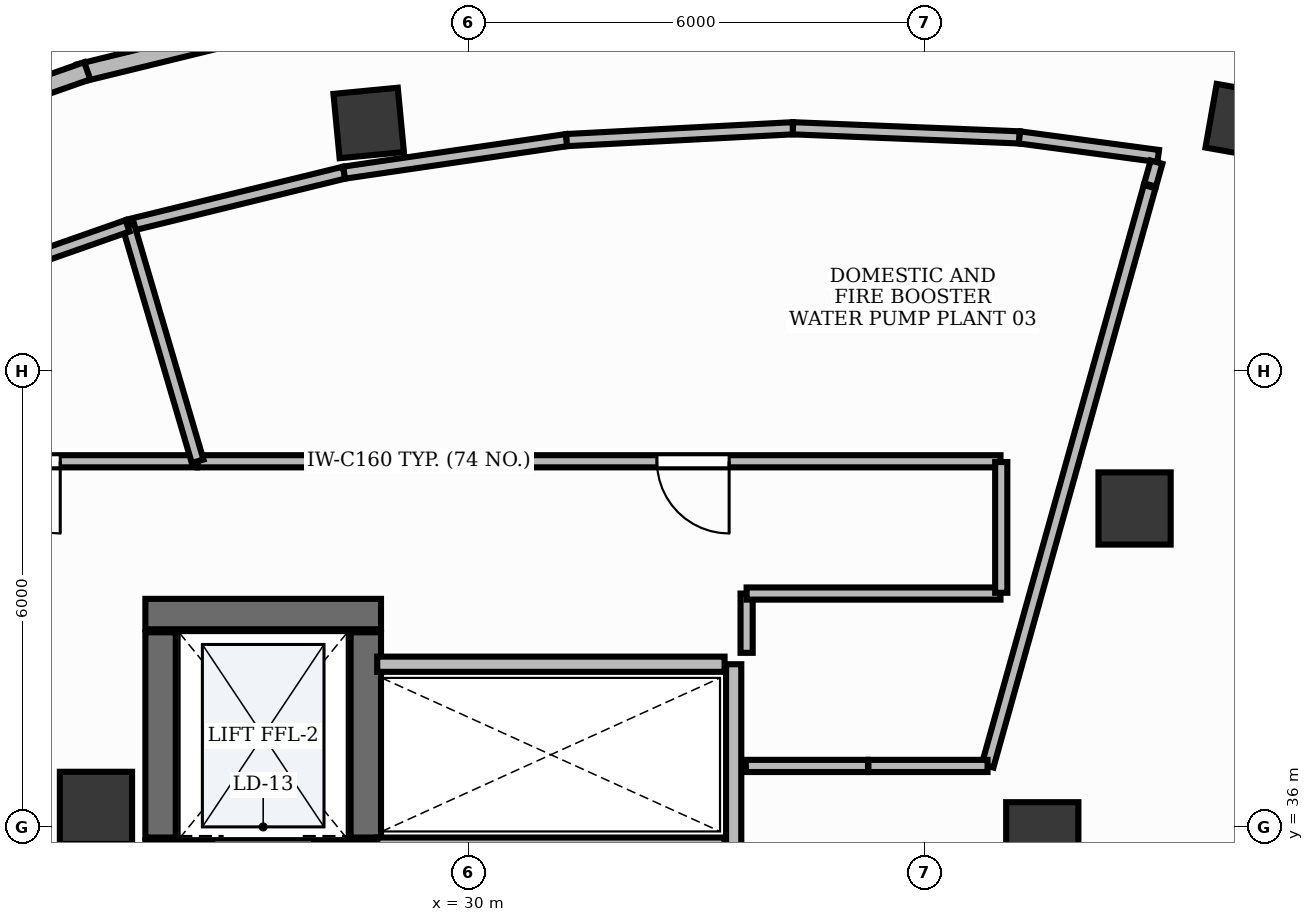
"""IFC4 building model, lengths in metres.
Left out: names, types, materials, properties, quantities, classifications, styles, units other than length and angle.
Written with IfcOpenShell. Run it as: python <this file> out.ifc"""

import sys

from ifc_helpers import new_model, si_unit, direction, frame, frame_2d, origin, origin_2d, place, context, subcontext, project, spatial, rectangle, extrude, element, fill, save


model = new_model("IFC4")
c1 = context("Model", 3, precision=1e-05, world=origin(), true_north=direction((0.0, 1.0)))
c2 = subcontext(c1, "Body", "Model", "MODEL_VIEW")
j1 = project(units=[si_unit("LENGTHUNIT", "METRE"), si_unit("PLANEANGLEUNIT", "RADIAN")], contexts=[c1])
p1 = place(None, origin())
s1 = spatial("IfcSite", under=j1, at=p1, CompositionType="ELEMENT")
p2 = place(p1, origin())
s2 = spatial("IfcBuilding", under=s1, at=p2, CompositionType="ELEMENT")
p3 = place(p2, frame((0.0, 0.0, 277.2)))
s3 = spatial("IfcBuildingStorey", under=s2, at=p3, CompositionType="ELEMENT", Elevation=277.2)
p4 = place(p3, frame((25.75, 38.8, 0.0), z_axis=(0.0, 0.0, 1.0), x_axis=(1.0, 0.0, 0.0)))
e1 = element("IfcWall", 1, at=p4, inside=s3, PredefinedType="SHEAR", context=c2, shape_type="SweptSolid", body=[
    extrude(rectangle(XDim=3.1, YDim=0.4, at=frame_2d((1.55, 0.0))), origin(), (0.0, 0.0, 1.0), 5.1),
])
p5 = place(p3, frame((25.75, 35.62, 0.0), z_axis=(0.0, 0.0, 1.0), x_axis=(1.0, 0.0, 0.0)))
e2 = element("IfcWall", 2, at=p5, inside=s3, PredefinedType="SHEAR", context=c2, shape_type="SweptSolid", body=[
    extrude(rectangle(XDim=3.1, YDim=0.4, at=frame_2d((1.55, 0.0))), origin(), (0.0, 0.0, 1.0), 5.1),
])
p6 = place(p5, frame((0.9, 0.0, 0.0)))
e3 = element("IfcOpeningElement", 3, at=p6, cuts=e2, PredefinedType="OPENING", context=c2, shape_type="SweptSolid", body=[
    extrude(rectangle(XDim=1.3, YDim=2.2, at=frame_2d((0.65, 1.1))), frame((0.0, 0.215, 0.0), z_axis=(0.0, -1.0, 0.0), x_axis=(1.0, 0.0, 0.0)), (0.0, 0.0, 1.0), 0.43),
])
for number, where, z_axis, x_axis in (
    (4, (25.95, 35.86, 0.0), (0.0, 0.0, 1.0), (0.0, 1.0, 0.0)),
    (5, (28.65, 35.86, 0.0), (0.0, 0.0, 1.0), (0.0, 1.0, 0.0)),
):
    element("IfcWall", number, at=place(p3, frame(where, z_axis=z_axis, x_axis=x_axis)), inside=s3, PredefinedType="SHEAR", context=c2, shape_type="SweptSolid", body=[
        extrude(rectangle(XDim=2.7, YDim=0.4, at=frame_2d((1.35, 0.0))), origin(), (0.0, 0.0, 1.0), 5.1),
    ])
for number, where, z_axis, x_axis in (
    (6, (37.55, 35.85, -0.0), (0.0, 0.0, 1.0), (1.0, 0.0, 0.0)),
    (7, (25.1, 36.25, -0.0), (0.0, 0.0, 1.0), (1.0, 0.0, 0.0)),
):
    element("IfcColumn", number, at=place(p3, frame(where, z_axis=z_axis, x_axis=x_axis)), inside=s3, PredefinedType="PILASTER", context=c2, shape_type="SweptSolid", body=[
        extrude(rectangle(XDim=0.95, YDim=0.95, at=origin_2d()), origin(), (0.0, 0.0, 1.0), 5.101),
    ])
p7 = place(p3, frame((40.189, 45.282, -0.0), z_axis=(0.0, 0.0, 1.0), x_axis=(-0.984868307662, 0.173304404339, 0.0)))
e8 = element("IfcColumn", 8, at=p7, inside=s3, PredefinedType="COLUMN", context=c2, shape_type="SweptSolid", body=[
    extrude(rectangle(XDim=0.85, YDim=0.85, at=origin_2d()), origin(), (0.0, 0.0, 1.0), 5.101),
])
p8 = place(p3, frame((38.764, 40.189, -0.0), z_axis=(0.0, 0.0, 1.0), x_axis=(1.0, 0.0, 0.0)))
e9 = element("IfcColumn", 9, at=p8, inside=s3, PredefinedType="COLUMN", context=c2, shape_type="SweptSolid", body=[
    extrude(rectangle(XDim=0.95, YDim=0.95, at=origin_2d()), origin(), (0.0, 0.0, 1.0), 5.101),
])
p9 = place(p3, frame((28.688, 45.261, -0.0), z_axis=(0.0, 0.0, 1.0), x_axis=(0.995462868748, 0.095150811579, 0.0)))
e10 = element("IfcColumn", 10, at=p9, inside=s3, PredefinedType="COLUMN", context=c2, shape_type="SweptSolid", body=[
    extrude(rectangle(XDim=0.85, YDim=0.85, at=origin_2d()), origin(), (0.0, 0.0, 1.0), 5.101),
])
p10 = place(p3, frame((28.015, 46.684, 0.0), z_axis=(0.0, 0.0, 1.0), x_axis=(-0.971313704184, -0.237801783141, 0.0)))
e11 = element("IfcWall", 11, at=p10, inside=s3, PredefinedType="STANDARD", context=c2, shape_type="SweptSolid", body=[
    extrude(rectangle(XDim=3.23, YDim=0.24, at=frame_2d((1.615, 0.0))), origin(), (0.0, 0.0, 1.0), 5.1),
])
p11 = place(p3, frame((24.985, 45.947, 0.0), z_axis=(0.0, 0.0, 1.0), x_axis=(-0.943487427594, -0.331408319104, 0.0)))
e12 = element("IfcWall", 12, at=p11, inside=s3, PredefinedType="STANDARD", context=c2, shape_type="SweptSolid", body=[
    extrude(rectangle(XDim=3.176, YDim=0.24, at=frame_2d((1.588, 0.0))), origin(), (0.0, 0.0, 1.0), 5.1),
])
p12 = place(p3, frame((33.49, 35.76, 0.0), z_axis=(0.0, 0.0, 1.0), x_axis=(0.0, 1.0, 0.0)))
e13 = element("IfcWall", 13, at=p12, inside=s3, PredefinedType="PARTITIONING", context=c2, shape_type="SweptSolid", body=[
    extrude(rectangle(XDim=2.38, YDim=0.2, at=frame_2d((1.19, 0.0))), origin(), (0.0, 0.0, 1.0), 3.41),
])
for number, where, z_axis, x_axis in (
    (14, (28.8, 35.76, 0.0), (0.0, 0.0, 1.0), (1.0, 0.0, 0.0)),
    (15, (28.8, 38.14, 0.0), (0.0, 0.0, 1.0), (1.0, 0.0, 0.0)),
):
    element("IfcWall", number, at=place(p3, frame(where, z_axis=z_axis, x_axis=x_axis)), inside=s3, PredefinedType="PARTITIONING", context=c2, shape_type="SweptSolid", body=[
        extrude(rectangle(XDim=4.57, YDim=0.2, at=frame_2d((2.285, 0.0))), origin(), (0.0, 0.0, 1.0), 3.41),
    ])
p13 = place(p3, frame((37.0, 40.81, 0.0), z_axis=(0.0, 0.0, 1.0), x_axis=(-1.0, 0.0, 0.0)))
e16 = element("IfcWall", 16, at=p13, inside=s3, PredefinedType="PARTITIONING", context=c2, shape_type="SweptSolid", body=[
    extrude(rectangle(XDim=10.562, YDim=0.16, at=frame_2d((5.281, 0.0))), origin(), (0.0, 0.0, 1.0), 3.41),
])
p14 = place(p13, frame((3.57, 0.0, 0.0)))
e17 = element("IfcOpeningElement", 17, at=p14, cuts=e16, PredefinedType="OPENING", context=c2, shape_type="SweptSolid", body=[
    extrude(rectangle(XDim=0.95, YDim=2.15, at=frame_2d((0.475, 1.075))), frame((0.0, 0.095, 0.0), z_axis=(0.0, -1.0, 0.0), x_axis=(1.0, 0.0, 0.0)), (0.0, 0.0, 1.0), 0.19),
])
p15 = place(p3, frame((26.427, 40.81, 0.0), z_axis=(0.0, 0.0, 1.0), x_axis=(-1.0, 0.0, 0.0)))
e18 = element("IfcWall", 18, at=p15, inside=s3, PredefinedType="PARTITIONING", context=c2, shape_type="SweptSolid", body=[
    extrude(rectangle(XDim=5.827, YDim=0.16, at=frame_2d((2.914, 0.0))), origin(), (0.0, 0.0, 1.0), 3.41),
])
p16 = place(p15, frame((1.797, 0.0, 0.0)))
e19 = element("IfcOpeningElement", 19, at=p16, cuts=e18, PredefinedType="OPENING", context=c2, shape_type="SweptSolid", body=[
    extrude(rectangle(XDim=0.95, YDim=2.15, at=frame_2d((0.475, 1.075))), frame((0.0, 0.095, 0.0), z_axis=(0.0, -1.0, 0.0), x_axis=(1.0, 0.0, 0.0)), (0.0, 0.0, 1.0), 0.19),
])
p17 = place(p3, frame((25.532, 43.913, 0.0), z_axis=(0.0, 0.0, 1.0), x_axis=(0.971298495948, 0.23786389337, 0.0)))
e20 = element("IfcWall", 20, at=p17, inside=s3, PredefinedType="PARTITIONING", context=c2, shape_type="SweptSolid", body=[
    extrude(rectangle(XDim=2.916, YDim=0.16, at=frame_2d((1.458, 0.0))), origin(), (0.0, 0.0, 1.0), 3.41),
])
p18 = place(p3, frame((28.364, 44.607, 0.0), z_axis=(0.0, 0.0, 1.0), x_axis=(0.989458468806, 0.144816913748, 0.0)))
e21 = element("IfcWall", 21, at=p18, inside=s3, PredefinedType="PARTITIONING", context=c2, shape_type="SweptSolid", body=[
    extrude(rectangle(XDim=2.959, YDim=0.16, at=frame_2d((1.479, 0.0))), origin(), (0.0, 0.0, 1.0), 3.41),
])
p19 = place(p3, frame((31.292, 45.035, 0.0), z_axis=(0.0, 0.0, 1.0), x_axis=(0.998634293536, 0.052245074151, 0.0)))
e22 = element("IfcWall", 22, at=p19, inside=s3, PredefinedType="PARTITIONING", context=c2, shape_type="SweptSolid", body=[
    extrude(rectangle(XDim=2.981, YDim=0.16, at=frame_2d((1.491, 0.0))), origin(), (0.0, 0.0, 1.0), 3.41),
])
p20 = place(p3, frame((34.269, 45.191, 0.0), z_axis=(0.0, 0.0, 1.0), x_axis=(0.999188752092, -0.040272046042, 0.0)))
e23 = element("IfcWall", 23, at=p20, inside=s3, PredefinedType="PARTITIONING", context=c2, shape_type="SweptSolid", body=[
    extrude(rectangle(XDim=2.983, YDim=0.16, at=frame_2d((1.491, 0.0))), origin(), (0.0, 0.0, 1.0), 3.41),
])
p21 = place(p3, frame((37.25, 45.071, 0.0), z_axis=(0.0, 0.0, 1.0), x_axis=(0.991157137256, -0.132693365573, 0.0)))
e24 = element("IfcWall", 24, at=p21, inside=s3, PredefinedType="PARTITIONING", context=c2, shape_type="SweptSolid", body=[
    extrude(rectangle(XDim=1.842, YDim=0.16, at=frame_2d((0.921, 0.0))), origin(), (0.0, 0.0, 1.0), 3.41),
])
p22 = place(p3, frame((39.053, 44.746, 0.0), z_axis=(0.0, 0.0, 1.0), x_axis=(-0.269862027116, -0.962899001101, 0.0)))
e25 = element("IfcWall", 25, at=p22, inside=s3, PredefinedType="PARTITIONING", context=c2, shape_type="SweptSolid", body=[
    extrude(rectangle(XDim=0.312, YDim=0.16, at=frame_2d((0.156, 0.0))), origin(), (0.0, 0.0, 1.0), 3.41),
])
p23 = place(p3, frame((38.962, 44.423, 0.0), z_axis=(0.0, 0.0, 1.0), x_axis=(-0.269473155441, -0.963007901575, 0.0)))
e26 = element("IfcWall", 26, at=p23, inside=s3, PredefinedType="PARTITIONING", context=c2, shape_type="SweptSolid", body=[
    extrude(rectangle(XDim=7.914, YDim=0.16, at=frame_2d((3.957, 0.0))), origin(), (0.0, 0.0, 1.0), 3.41),
])
p24 = place(p3, frame((36.83, 36.802, 0.0), z_axis=(0.0, 0.0, 1.0), x_axis=(-1.0, 0.0, 0.0)))
e27 = element("IfcWall", 27, at=p24, inside=s3, PredefinedType="PARTITIONING", context=c2, shape_type="SweptSolid", body=[
    extrude(rectangle(XDim=1.568, YDim=0.16, at=frame_2d((0.784, 0.0))), origin(), (0.0, 0.0, 1.0), 3.41),
])
p25 = place(p3, frame((35.257, 36.802, 0.0), z_axis=(0.0, 0.0, 1.0), x_axis=(-1.0, 0.0, 0.0)))
e28 = element("IfcWall", 28, at=p25, inside=s3, PredefinedType="PARTITIONING", context=c2, shape_type="SweptSolid", body=[
    extrude(rectangle(XDim=1.607, YDim=0.16, at=frame_2d((0.804, 0.0))), origin(), (0.0, 0.0, 1.0), 3.41),
])
p26 = place(p3, frame((33.66, 38.29, 0.0), z_axis=(0.0, 0.0, 1.0), x_axis=(0.0, 1.0, 0.0)))
e29 = element("IfcWall", 29, at=p26, inside=s3, PredefinedType="PARTITIONING", context=c2, shape_type="SweptSolid", body=[
    extrude(rectangle(XDim=0.78, YDim=0.16, at=frame_2d((0.39, 0.0))), origin(), (0.0, 0.0, 1.0), 3.41),
])
p27 = place(p3, frame((33.66, 39.07, 0.0), z_axis=(0.0, 0.0, 1.0), x_axis=(1.0, 0.0, 0.0)))
e30 = element("IfcWall", 30, at=p27, inside=s3, PredefinedType="PARTITIONING", context=c2, shape_type="SweptSolid", body=[
    extrude(rectangle(XDim=3.34, YDim=0.16, at=frame_2d((1.67, 0.0))), origin(), (0.0, 0.0, 1.0), 3.41),
])
p28 = place(p3, frame((37.01, 39.08, 0.0), z_axis=(0.0, 0.0, 1.0), x_axis=(0.0, 1.0, 0.0)))
e31 = element("IfcWall", 31, at=p28, inside=s3, PredefinedType="PARTITIONING", context=c2, shape_type="SweptSolid", body=[
    extrude(rectangle(XDim=1.72, YDim=0.16, at=frame_2d((0.86, 0.0))), origin(), (0.0, 0.0, 1.0), 3.41),
])
p29 = place(p3, frame((26.438, 40.81, 0.0), z_axis=(0.0, 0.0, 1.0), x_axis=(-0.282333978725, 0.959316175438, 0.0)))
e32 = element("IfcWall", 32, at=p29, inside=s3, PredefinedType="PARTITIONING", context=c2, shape_type="SweptSolid", body=[
    extrude(rectangle(XDim=3.232, YDim=0.16, at=frame_2d((1.616, 0.0))), origin(), (0.0, 0.0, 1.0), 3.41),
])
p30 = place(p3, frame((22.838, 42.967, 0.0), z_axis=(0.0, 0.0, 1.0), x_axis=(0.943475411787, 0.331442524962, 0.0)))
e33 = element("IfcWall", 33, at=p30, inside=s3, PredefinedType="PARTITIONING", context=c2, shape_type="SweptSolid", body=[
    extrude(rectangle(XDim=2.837, YDim=0.16, at=frame_2d((1.419, 0.0))), origin(), (0.0, 0.0, 1.0), 3.41),
])
p31 = place(p14, origin())
e34 = element("IfcDoor", 34, at=p31, inside=s3, OperationType="SINGLE_SWING_LEFT", PredefinedType="DOOR", context=c2, shape_type="SweptSolid", body=[
    extrude(rectangle(XDim=0.95, YDim=2.15, at=frame_2d((0.475, 1.075))), frame((0.0, 0.025, 0.0), z_axis=(0.0, -1.0, 0.0), x_axis=(1.0, 0.0, 0.0)), (0.0, 0.0, 1.0), 0.05),
])
fill(e17, e34)
p32 = place(p16, origin())
e35 = element("IfcDoor", 35, at=p32, inside=s3, OperationType="SINGLE_SWING_LEFT", PredefinedType="DOOR", context=c2, shape_type="SweptSolid", body=[
    extrude(rectangle(XDim=0.95, YDim=2.15, at=frame_2d((0.475, 1.075))), frame((0.0, 0.025, 0.0), z_axis=(0.0, -1.0, 0.0), x_axis=(1.0, 0.0, 0.0)), (0.0, 0.0, 1.0), 0.05),
])
fill(e19, e35)
save(model, sys.argv[1])
